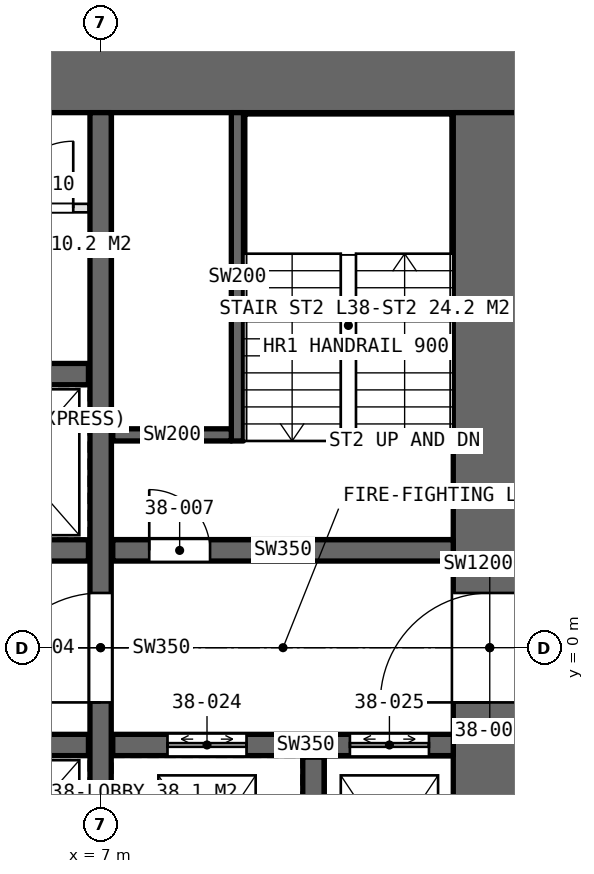
"""IFC4 building model, lengths in metres.
Left out: names, types, materials, properties, quantities, classifications, styles, units other than length and angle.
Written with IfcOpenShell. Run it as: python <this file> out.ifc"""

import sys

from ifc_helpers import new_model, si_unit, direction, frame, frame_2d, origin, place, context, subcontext, project, spatial, rectangle, extrude, element, fill, save


model = new_model("IFC4")
c1 = context("Model", 3, precision=1e-05, world=origin(), true_north=direction((0.0, 1.0)))
c2 = subcontext(c1, "Body", "Model", "MODEL_VIEW")
j1 = project(units=[si_unit("LENGTHUNIT", "METRE"), si_unit("PLANEANGLEUNIT", "RADIAN")], contexts=[c1])
p1 = place(None, origin())
s1 = spatial("IfcSite", under=j1, at=p1, CompositionType="ELEMENT")
p2 = place(p1, origin())
s2 = spatial("IfcBuilding", under=s1, at=p2, CompositionType="ELEMENT")
p3 = place(p2, frame((0.0, 0.0, 176.4)))
s3 = spatial("IfcBuildingStorey", under=s2, at=p3, CompositionType="ELEMENT", Elevation=176.4)
p4 = place(p3, frame((14.0, 9.4, 0.0), z_axis=(0.0, 0.0, 1.0), x_axis=(-1.0, 0.0, 0.0)))
e1 = element("IfcWall", 1, at=p4, inside=s3, PredefinedType="SHEAR", context=c2, shape_type="SweptSolid", body=[
    extrude(rectangle(XDim=28.0, YDim=1.2, at=frame_2d((14.0, 0.0))), origin(), (0.0, 0.0, 1.0), 4.2),
])
p5 = place(p4, frame((24.0, 0.0, 0.0)))
e2 = element("IfcOpeningElement", 2, at=p5, cuts=e1, PredefinedType="OPENING", context=c2, shape_type="SweptSolid", body=[
    extrude(rectangle(XDim=1.0, YDim=2.4, at=frame_2d((0.5, 1.2))), frame((0.0, 0.61, 0.0), z_axis=(0.0, -1.0, 0.0), x_axis=(1.0, 0.0, 0.0)), (0.0, 0.0, 1.0), 1.22),
])
p6 = place(p4, frame((13.1, 0.0, 0.0)))
e3 = element("IfcOpeningElement", 3, at=p6, cuts=e1, PredefinedType="OPENING", context=c2, shape_type="SweptSolid", body=[
    extrude(rectangle(XDim=1.8, YDim=2.4, at=frame_2d((0.9, 1.2))), frame((0.0, 0.61, 0.0), z_axis=(0.0, -1.0, 0.0), x_axis=(1.0, 0.0, 0.0)), (0.0, 0.0, 1.0), 1.22),
])
p7 = place(p3, frame((13.4, -8.8, 0.0), z_axis=(0.0, 0.0, 1.0), x_axis=(0.0, 1.0, 0.0)))
e4 = element("IfcWall", 4, at=p7, inside=s3, PredefinedType="SHEAR", context=c2, shape_type="SweptSolid", body=[
    extrude(rectangle(XDim=17.6, YDim=1.2, at=frame_2d((8.8, 0.0))), origin(), (0.0, 0.0, 1.0), 4.2),
])
p8 = place(p7, frame((7.9, 0.0, 0.0)))
e5 = element("IfcOpeningElement", 5, at=p8, cuts=e4, PredefinedType="OPENING", context=c2, shape_type="SweptSolid", body=[
    extrude(rectangle(XDim=1.8, YDim=2.4, at=frame_2d((0.9, 1.2))), frame((0.0, 0.61, 0.0), z_axis=(0.0, -1.0, 0.0), x_axis=(1.0, 0.0, 0.0)), (0.0, 0.0, 1.0), 1.22),
])
p9 = place(p3, frame((7.0, -8.8, 0.0), z_axis=(0.0, 0.0, 1.0), x_axis=(0.0, 1.0, 0.0)))
e6 = element("IfcWall", 6, at=p9, inside=s3, PredefinedType="SHEAR", context=c2, shape_type="SweptSolid", body=[
    extrude(rectangle(XDim=17.6, YDim=0.35, at=frame_2d((8.8, 0.0))), origin(), (0.0, 0.0, 1.0), 4.2),
])
p10 = place(p9, frame((7.9, 0.0, 0.0)))
e7 = element("IfcOpeningElement", 7, at=p10, cuts=e6, PredefinedType="OPENING", context=c2, shape_type="SweptSolid", body=[
    extrude(rectangle(XDim=1.8, YDim=2.4, at=frame_2d((0.9, 1.2))), frame((0.0, 0.185, 0.0), z_axis=(0.0, -1.0, 0.0), x_axis=(1.0, 0.0, 0.0)), (0.0, 0.0, 1.0), 0.37),
])
p11 = place(p3, frame((-6.8, 1.6, 0.0), z_axis=(0.0, 0.0, 1.0), x_axis=(1.0, 0.0, 0.0)))
e8 = element("IfcWall", 8, at=p11, inside=s3, PredefinedType="SHEAR", context=c2, shape_type="SweptSolid", body=[
    extrude(rectangle(XDim=13.6, YDim=0.35, at=frame_2d((6.8, 0.0))), origin(), (0.0, 0.0, 1.0), 4.2),
])
p12 = place(p11, frame((1.315, 0.0, 0.0)))
e9 = element("IfcOpeningElement", 9, at=p12, cuts=e8, PredefinedType="OPENING", context=c2, shape_type="SweptSolid", body=[
    extrude(rectangle(XDim=0.9, YDim=2.4, at=frame_2d((0.45, 1.2))), frame((0.0, 0.185, 0.0), z_axis=(0.0, -1.0, 0.0), x_axis=(1.0, 0.0, 0.0)), (0.0, 0.0, 1.0), 0.37),
])
p13 = place(p11, frame((4.05, 0.0, 0.0)))
e10 = element("IfcOpeningElement", 10, at=p13, cuts=e8, PredefinedType="OPENING", context=c2, shape_type="SweptSolid", body=[
    extrude(rectangle(XDim=0.9, YDim=2.4, at=frame_2d((0.45, 1.2))), frame((0.0, 0.185, 0.0), z_axis=(0.0, -1.0, 0.0), x_axis=(1.0, 0.0, 0.0)), (0.0, 0.0, 1.0), 0.37),
])
p14 = place(p11, frame((7.685, 0.0, 0.0)))
e11 = element("IfcOpeningElement", 11, at=p14, cuts=e8, PredefinedType="OPENING", context=c2, shape_type="SweptSolid", body=[
    extrude(rectangle(XDim=0.9, YDim=2.4, at=frame_2d((0.45, 1.2))), frame((0.0, 0.185, 0.0), z_axis=(0.0, -1.0, 0.0), x_axis=(1.0, 0.0, 0.0)), (0.0, 0.0, 1.0), 0.37),
])
p15 = place(p3, frame((-6.8, -1.6, 0.0), z_axis=(0.0, 0.0, 1.0), x_axis=(1.0, 0.0, 0.0)))
e12 = element("IfcWall", 12, at=p15, inside=s3, PredefinedType="SHEAR", context=c2, shape_type="SweptSolid", body=[
    extrude(rectangle(XDim=13.6, YDim=0.35, at=frame_2d((6.8, 0.0))), origin(), (0.0, 0.0, 1.0), 4.2),
])
p16 = place(p15, frame((0.7, 0.0, 0.0)))
e13 = element("IfcOpeningElement", 13, at=p16, cuts=e12, PredefinedType="OPENING", context=c2, shape_type="SweptSolid", body=[
    extrude(rectangle(XDim=1.1, YDim=2.4, at=frame_2d((0.55, 1.2))), frame((0.0, 0.185, 0.0), z_axis=(0.0, -1.0, 0.0), x_axis=(1.0, 0.0, 0.0)), (0.0, 0.0, 1.0), 0.37),
])
p17 = place(p15, frame((3.5, 0.0, 0.0)))
e14 = element("IfcOpeningElement", 14, at=p17, cuts=e12, PredefinedType="OPENING", context=c2, shape_type="SweptSolid", body=[
    extrude(rectangle(XDim=1.1, YDim=2.4, at=frame_2d((0.55, 1.2))), frame((0.0, 0.185, 0.0), z_axis=(0.0, -1.0, 0.0), x_axis=(1.0, 0.0, 0.0)), (0.0, 0.0, 1.0), 0.37),
])
p18 = place(p15, frame((6.3, 0.0, 0.0)))
e15 = element("IfcOpeningElement", 15, at=p18, cuts=e12, PredefinedType="OPENING", context=c2, shape_type="SweptSolid", body=[
    extrude(rectangle(XDim=1.1, YDim=2.4, at=frame_2d((0.55, 1.2))), frame((0.0, 0.185, 0.0), z_axis=(0.0, -1.0, 0.0), x_axis=(1.0, 0.0, 0.0)), (0.0, 0.0, 1.0), 0.37),
])
p19 = place(p15, frame((9.1, 0.0, 0.0)))
e16 = element("IfcOpeningElement", 16, at=p19, cuts=e12, PredefinedType="OPENING", context=c2, shape_type="SweptSolid", body=[
    extrude(rectangle(XDim=1.1, YDim=2.4, at=frame_2d((0.55, 1.2))), frame((0.0, 0.185, 0.0), z_axis=(0.0, -1.0, 0.0), x_axis=(1.0, 0.0, 0.0)), (0.0, 0.0, 1.0), 0.37),
])
p20 = place(p3, frame((-6.8, 4.5, 0.0), z_axis=(0.0, 0.0, 1.0), x_axis=(1.0, 0.0, 0.0)))
e17 = element("IfcWall", 17, at=p20, inside=s3, PredefinedType="SHEAR", context=c2, shape_type="SweptSolid", body=[
    extrude(rectangle(XDim=13.6, YDim=0.35, at=frame_2d((6.8, 0.0))), origin(), (0.0, 0.0, 1.0), 4.2),
])
p21 = place(p3, frame((7.2, 1.6, 0.0), z_axis=(0.0, 0.0, 1.0), x_axis=(1.0, 0.0, 0.0)))
e18 = element("IfcWall", 18, at=p21, inside=s3, PredefinedType="SHEAR", context=c2, shape_type="SweptSolid", body=[
    extrude(rectangle(XDim=5.6, YDim=0.35, at=frame_2d((2.8, 0.0))), origin(), (0.0, 0.0, 1.0), 4.2),
])
p22 = place(p21, frame((0.6, 0.0, 0.0)))
e19 = element("IfcOpeningElement", 19, at=p22, cuts=e18, PredefinedType="OPENING", context=c2, shape_type="SweptSolid", body=[
    extrude(rectangle(XDim=1.0, YDim=2.4, at=frame_2d((0.5, 1.2))), frame((0.0, 0.185, 0.0), z_axis=(0.0, -1.0, 0.0), x_axis=(1.0, 0.0, 0.0)), (0.0, 0.0, 1.0), 0.37),
])
p23 = place(p3, frame((7.2, -1.6, 0.0), z_axis=(0.0, 0.0, 1.0), x_axis=(1.0, 0.0, 0.0)))
e20 = element("IfcWall", 20, at=p23, inside=s3, PredefinedType="SHEAR", context=c2, shape_type="SweptSolid", body=[
    extrude(rectangle(XDim=5.6, YDim=0.35, at=frame_2d((2.8, 0.0))), origin(), (0.0, 0.0, 1.0), 4.2),
])
p24 = place(p23, frame((0.9, 0.0, 0.0)))
e21 = element("IfcOpeningElement", 21, at=p24, cuts=e20, PredefinedType="OPENING", context=c2, shape_type="SweptSolid", body=[
    extrude(rectangle(XDim=1.3, YDim=2.4, at=frame_2d((0.65, 1.2))), frame((0.0, 0.185, 0.0), z_axis=(0.0, -1.0, 0.0), x_axis=(1.0, 0.0, 0.0)), (0.0, 0.0, 1.0), 0.37),
])
p25 = place(p23, frame((3.9, 0.0, 0.0)))
e22 = element("IfcOpeningElement", 22, at=p25, cuts=e20, PredefinedType="OPENING", context=c2, shape_type="SweptSolid", body=[
    extrude(rectangle(XDim=1.3, YDim=2.4, at=frame_2d((0.65, 1.2))), frame((0.0, 0.185, 0.0), z_axis=(0.0, -1.0, 0.0), x_axis=(1.0, 0.0, 0.0)), (0.0, 0.0, 1.0), 0.37),
])
p26 = place(p3, frame((10.5, -4.8, 0.0), z_axis=(0.0, 0.0, 1.0), x_axis=(0.0, 1.0, 0.0)))
e23 = element("IfcWall", 23, at=p26, inside=s3, PredefinedType="SHEAR", context=c2, shape_type="SweptSolid", body=[
    extrude(rectangle(XDim=3.0, YDim=0.35, at=frame_2d((1.5, 0.0))), origin(), (0.0, 0.0, 1.0), 4.2),
])
p27 = place(p3, frame((-6.8, 7.23, 0.0), z_axis=(0.0, 0.0, 1.0), x_axis=(1.0, 0.0, 0.0)))
e24 = element("IfcWall", 24, at=p27, inside=s3, PredefinedType="PARTITIONING", context=c2, shape_type="SweptSolid", body=[
    extrude(rectangle(XDim=13.6, YDim=0.14, at=frame_2d((6.8, 0.0))), origin(), (0.0, 0.0, 1.0), 3.95),
])
p28 = place(p27, frame((3.28, 0.0, 0.0)))
e25 = element("IfcOpeningElement", 25, at=p28, cuts=e24, PredefinedType="OPENING", context=c2, shape_type="SweptSolid", body=[
    extrude(rectangle(XDim=1.0, YDim=2.4, at=frame_2d((0.5, 1.2))), frame((0.0, 0.08, 0.0), z_axis=(0.0, -1.0, 0.0), x_axis=(1.0, 0.0, 0.0)), (0.0, 0.0, 1.0), 0.16),
])
p29 = place(p27, frame((8.08, 0.0, 0.0)))
e26 = element("IfcOpeningElement", 26, at=p29, cuts=e24, PredefinedType="OPENING", context=c2, shape_type="SweptSolid", body=[
    extrude(rectangle(XDim=1.0, YDim=2.4, at=frame_2d((0.5, 1.2))), frame((0.0, 0.08, 0.0), z_axis=(0.0, -1.0, 0.0), x_axis=(1.0, 0.0, 0.0)), (0.0, 0.0, 1.0), 0.16),
])
p30 = place(p27, frame((12.25, 0.0, 0.0)))
e27 = element("IfcOpeningElement", 27, at=p30, cuts=e24, PredefinedType="OPENING", context=c2, shape_type="SweptSolid", body=[
    extrude(rectangle(XDim=1.1, YDim=2.4, at=frame_2d((0.55, 1.2))), frame((0.0, 0.08, 0.0), z_axis=(0.0, -1.0, 0.0), x_axis=(1.0, 0.0, 0.0)), (0.0, 0.0, 1.0), 0.16),
])
p31 = place(p3, frame((9.25, 3.4, 0.0), z_axis=(0.0, 0.0, 1.0), x_axis=(0.0, 1.0, 0.0)))
e28 = element("IfcWall", 28, at=p31, inside=s3, PredefinedType="SOLIDWALL", context=c2, shape_type="SweptSolid", body=[
    extrude(rectangle(XDim=5.4, YDim=0.2, at=frame_2d((2.7, 0.0))), origin(), (0.0, 0.0, 1.0), 4.2),
])
p32 = place(p3, frame((9.15, 3.5, 0.0), z_axis=(0.0, 0.0, 1.0), x_axis=(-1.0, 0.0, 0.0)))
e29 = element("IfcWall", 29, at=p32, inside=s3, PredefinedType="SOLIDWALL", context=c2, shape_type="SweptSolid", body=[
    extrude(rectangle(XDim=1.95, YDim=0.2, at=frame_2d((0.975, 0.0))), origin(), (0.0, 0.0, 1.0), 4.2),
])
p33 = place(p8, origin())
e30 = element("IfcDoor", 30, at=p33, inside=s3, OperationType="DOUBLE_DOOR_SINGLE_SWING", PredefinedType="DOOR", context=c2, shape_type="SweptSolid", body=[
    extrude(rectangle(XDim=1.8, YDim=2.4, at=frame_2d((0.9, 1.2))), frame((0.0, 0.025, 0.0), z_axis=(0.0, -1.0, 0.0), x_axis=(1.0, 0.0, 0.0)), (0.0, 0.0, 1.0), 0.05),
])
fill(e5, e30)
p34 = place(p10, origin())
e31 = element("IfcDoor", 31, at=p34, inside=s3, OperationType="DOUBLE_DOOR_SINGLE_SWING", PredefinedType="DOOR", context=c2, shape_type="SweptSolid", body=[
    extrude(rectangle(XDim=1.8, YDim=2.4, at=frame_2d((0.9, 1.2))), frame((0.0, 0.025, 0.0), z_axis=(0.0, -1.0, 0.0), x_axis=(1.0, 0.0, 0.0)), (0.0, 0.0, 1.0), 0.05),
])
fill(e7, e31)
p35 = place(p22, origin())
e32 = element("IfcDoor", 32, at=p35, inside=s3, OperationType="SINGLE_SWING_LEFT", PredefinedType="DOOR", context=c2, shape_type="SweptSolid", body=[
    extrude(rectangle(XDim=1.0, YDim=2.4, at=frame_2d((0.5, 1.2))), frame((0.0, 0.025, 0.0), z_axis=(0.0, -1.0, 0.0), x_axis=(1.0, 0.0, 0.0)), (0.0, 0.0, 1.0), 0.05),
])
fill(e19, e32)
p36 = place(p30, origin())
e33 = element("IfcDoor", 33, at=p36, inside=s3, OperationType="SINGLE_SWING_RIGHT", PredefinedType="DOOR", context=c2, shape_type="SweptSolid", body=[
    extrude(rectangle(XDim=1.1, YDim=2.4, at=frame_2d((0.55, 1.2))), frame((0.0, 0.025, 0.0), z_axis=(0.0, -1.0, 0.0), x_axis=(1.0, 0.0, 0.0)), (0.0, 0.0, 1.0), 0.05),
])
fill(e27, e33)
p37 = place(p24, origin())
e34 = element("IfcDoor", 34, at=p37, inside=s3, OperationType="DOUBLE_DOOR_SLIDING", PredefinedType="DOOR", context=c2, shape_type="SweptSolid", body=[
    extrude(rectangle(XDim=1.3, YDim=2.4, at=frame_2d((0.65, 1.2))), frame((0.0, 0.025, 0.0), z_axis=(0.0, -1.0, 0.0), x_axis=(1.0, 0.0, 0.0)), (0.0, 0.0, 1.0), 0.05),
])
fill(e21, e34)
p38 = place(p25, origin())
e35 = element("IfcDoor", 35, at=p38, inside=s3, OperationType="DOUBLE_DOOR_SLIDING", PredefinedType="DOOR", context=c2, shape_type="SweptSolid", body=[
    extrude(rectangle(XDim=1.3, YDim=2.4, at=frame_2d((0.65, 1.2))), frame((0.0, 0.025, 0.0), z_axis=(0.0, -1.0, 0.0), x_axis=(1.0, 0.0, 0.0)), (0.0, 0.0, 1.0), 0.05),
])
fill(e22, e35)
save(model, sys.argv[1])
